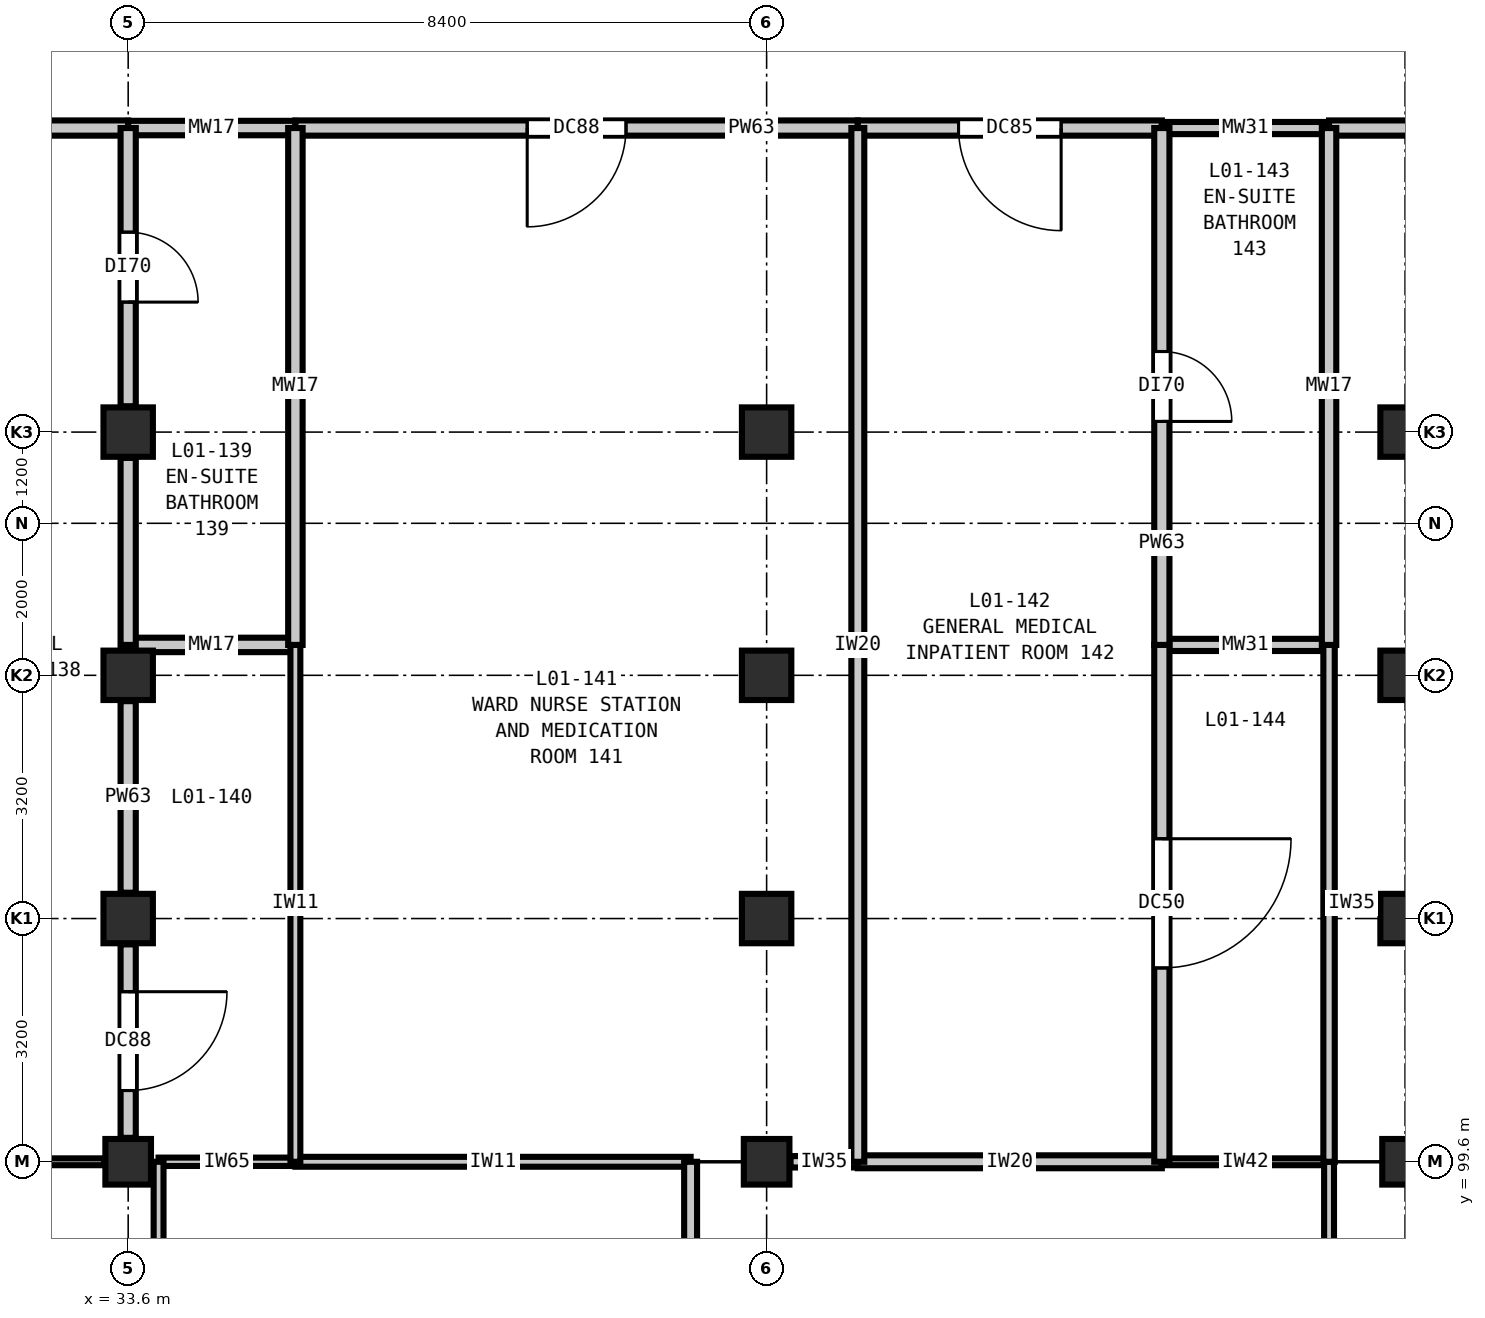
"""IFC4 building model, lengths in metres.
Left out: names, types, materials, properties, quantities, classifications, styles, units other than length and angle.
Written with IfcOpenShell. Run it as: python <this file> out.ifc"""

import sys

from ifc_helpers import new_model, si_unit, direction, frame, frame_2d, origin, origin_2d, place, context, subcontext, project, spatial, rectangle, extrude, element, fill, save


model = new_model("IFC4")
c1 = context("Model", 3, precision=1e-05, world=origin(), true_north=direction((0.0, 1.0)))
c2 = subcontext(c1, "Body", "Model", "MODEL_VIEW")
j1 = project(units=[si_unit("LENGTHUNIT", "METRE"), si_unit("PLANEANGLEUNIT", "RADIAN")], contexts=[c1])
p1 = place(None, origin())
s1 = spatial("IfcSite", under=j1, at=p1, CompositionType="ELEMENT")
p2 = place(p1, origin())
s2 = spatial("IfcBuilding", under=s1, at=p2, CompositionType="ELEMENT")
p3 = place(p2, frame((0.0, 0.0, 5.4)))
s3 = spatial("IfcBuildingStorey", under=s2, at=p3, CompositionType="ELEMENT", Elevation=5.4)
p4 = place(p3, frame((33.6, 99.6, 0.0), z_axis=(0.0, 0.0, 1.0), x_axis=(1.0, 0.0, 0.0)))
e1 = element("IfcColumn", 1, at=p4, inside=s3, PredefinedType="COLUMN", context=c2, shape_type="SweptSolid", body=[
    extrude(rectangle(XDim=0.6, YDim=0.6, at=origin_2d()), origin(), (0.0, 0.0, 1.0), 5.4),
])
for number, where, z_axis, x_axis in (
    (2, (33.6, 102.8, 0.0), (0.0, 0.0, 1.0), (1.0, 0.0, 0.0)),
    (3, (33.6, 106.0, 0.0), (0.0, 0.0, 1.0), (1.0, 0.0, 0.0)),
    (4, (33.6, 109.2, 0.0), (0.0, 0.0, 1.0), (1.0, 0.0, 0.0)),
):
    element("IfcColumn", number, at=place(p3, frame(where, z_axis=z_axis, x_axis=x_axis)), inside=s3, PredefinedType="COLUMN", context=c2, shape_type="SweptSolid", body=[
        extrude(rectangle(XDim=0.65, YDim=0.65, at=origin_2d()), origin(), (0.0, 0.0, 1.0), 5.4),
    ])
p5 = place(p3, frame((42.0, 99.6, 0.0), z_axis=(0.0, 0.0, 1.0), x_axis=(1.0, 0.0, 0.0)))
e5 = element("IfcColumn", 5, at=p5, inside=s3, PredefinedType="COLUMN", context=c2, shape_type="SweptSolid", body=[
    extrude(rectangle(XDim=0.6, YDim=0.6, at=origin_2d()), origin(), (0.0, 0.0, 1.0), 5.4),
])
for number, where, z_axis, x_axis in (
    (6, (42.0, 102.8, 0.0), (0.0, 0.0, 1.0), (1.0, 0.0, 0.0)),
    (7, (42.0, 106.0, 0.0), (0.0, 0.0, 1.0), (1.0, 0.0, 0.0)),
    (8, (42.0, 109.2, 0.0), (0.0, 0.0, 1.0), (1.0, 0.0, 0.0)),
):
    element("IfcColumn", number, at=place(p3, frame(where, z_axis=z_axis, x_axis=x_axis)), inside=s3, PredefinedType="COLUMN", context=c2, shape_type="SweptSolid", body=[
        extrude(rectangle(XDim=0.65, YDim=0.65, at=origin_2d()), origin(), (0.0, 0.0, 1.0), 5.4),
    ])
p6 = place(p3, frame((50.4, 99.6, 0.0), z_axis=(0.0, 0.0, 1.0), x_axis=(1.0, 0.0, 0.0)))
e9 = element("IfcColumn", 9, at=p6, inside=s3, PredefinedType="COLUMN", context=c2, shape_type="SweptSolid", body=[
    extrude(rectangle(XDim=0.6, YDim=0.6, at=origin_2d()), origin(), (0.0, 0.0, 1.0), 5.4),
])
for number, where, z_axis, x_axis in (
    (10, (50.4, 102.8, 0.0), (0.0, 0.0, 1.0), (1.0, 0.0, 0.0)),
    (11, (50.4, 106.0, 0.0), (0.0, 0.0, 1.0), (1.0, 0.0, 0.0)),
    (12, (50.4, 109.2, 0.0), (0.0, 0.0, 1.0), (1.0, 0.0, 0.0)),
):
    element("IfcColumn", number, at=place(p3, frame(where, z_axis=z_axis, x_axis=x_axis)), inside=s3, PredefinedType="COLUMN", context=c2, shape_type="SweptSolid", body=[
        extrude(rectangle(XDim=0.65, YDim=0.65, at=origin_2d()), origin(), (0.0, 0.0, 1.0), 5.4),
    ])
p7 = place(p3, frame((29.6, 99.6, 0.0), z_axis=(0.0, 0.0, 1.0), x_axis=(1.0, 0.0, 0.0)))
e13 = element("IfcWall", 13, at=p7, inside=s3, PredefinedType="PARTITIONING", context=c2, shape_type="SweptSolid", body=[
    extrude(rectangle(XDim=3.685, YDim=0.09, at=frame_2d((1.842, 0.0))), origin(), (0.0, 0.0, 1.0), 4.685),
])
p8 = place(p3, frame((34.0, 99.6, 0.0), z_axis=(0.0, 0.0, 1.0), x_axis=(1.0, 0.0, 0.0)))
e14 = element("IfcWall", 14, at=p8, inside=s3, PredefinedType="PARTITIONING", context=c2, shape_type="SweptSolid", body=[
    extrude(rectangle(XDim=1.8, YDim=0.11, at=frame_2d((0.9, 0.0))), origin(), (0.0, 0.0, 1.0), 4.685),
])
p9 = place(p3, frame((35.8, 99.6, 0.0), z_axis=(0.0, 0.0, 1.0), x_axis=(1.0, 0.0, 0.0)))
e15 = element("IfcWall", 15, at=p9, inside=s3, PredefinedType="PARTITIONING", context=c2, shape_type="SweptSolid", body=[
    extrude(rectangle(XDim=5.2, YDim=0.13, at=frame_2d((2.6, 0.0))), origin(), (0.0, 0.0, 1.0), 4.685),
])
p10 = place(p3, frame((42.315, 99.6, 0.0), z_axis=(0.0, 0.0, 1.0), x_axis=(1.0, 0.0, 0.0)))
e16 = element("IfcWall", 16, at=p10, inside=s3, PredefinedType="PARTITIONING", context=c2, shape_type="SweptSolid", body=[
    extrude(rectangle(XDim=0.885, YDim=0.15, at=frame_2d((0.442, 0.0))), origin(), (0.0, 0.0, 1.0), 4.685),
])
p11 = place(p3, frame((43.2, 99.6, 0.0), z_axis=(0.0, 0.0, 1.0), x_axis=(1.0, 0.0, 0.0)))
e17 = element("IfcWall", 17, at=p11, inside=s3, PredefinedType="PARTITIONING", context=c2, shape_type="SweptSolid", body=[
    extrude(rectangle(XDim=4.0, YDim=0.17, at=frame_2d((2.0, 0.0))), origin(), (0.0, 0.0, 1.0), 4.685),
])
p12 = place(p3, frame((47.2, 99.6, 0.0), z_axis=(0.0, 0.0, 1.0), x_axis=(1.0, 0.0, 0.0)))
e18 = element("IfcWall", 18, at=p12, inside=s3, PredefinedType="PARTITIONING", context=c2, shape_type="SweptSolid", body=[
    extrude(rectangle(XDim=2.2, YDim=0.09, at=frame_2d((1.1, 0.0))), origin(), (0.0, 0.0, 1.0), 4.685),
])
p13 = place(p3, frame((33.6, 106.4, 0.0), z_axis=(0.0, 0.0, 1.0), x_axis=(1.0, 0.0, 0.0)))
e19 = element("IfcWall", 19, at=p13, inside=s3, PredefinedType="PLUMBINGWALL", context=c2, shape_type="SweptSolid", body=[
    extrude(rectangle(XDim=2.2, YDim=0.19, at=frame_2d((1.1, 0.0))), origin(), (0.0, 0.0, 1.0), 5.05),
])
p14 = place(p3, frame((47.2, 106.4, 0.0), z_axis=(0.0, 0.0, 1.0), x_axis=(1.0, 0.0, 0.0)))
e20 = element("IfcWall", 20, at=p14, inside=s3, PredefinedType="PLUMBINGWALL", context=c2, shape_type="SweptSolid", body=[
    extrude(rectangle(XDim=2.2, YDim=0.16, at=frame_2d((1.1, 0.0))), origin(), (0.0, 0.0, 1.0), 5.05),
])
p15 = place(p3, frame((29.6, 113.2, 0.0), z_axis=(0.0, 0.0, 1.0), x_axis=(1.0, 0.0, 0.0)))
e21 = element("IfcWall", 21, at=p15, inside=s3, PredefinedType="PARTITIONING", context=c2, shape_type="SweptSolid", body=[
    extrude(rectangle(XDim=4.0, YDim=0.2, at=frame_2d((2.0, 0.0))), origin(), (0.0, 0.0, 1.0), 5.05),
])
p16 = place(p15, frame((1.375, 0.0, 0.0)))
e22 = element("IfcOpeningElement", 22, at=p16, cuts=e21, PredefinedType="OPENING", context=c2, shape_type="SweptSolid", body=[
    extrude(rectangle(XDim=1.25, YDim=2.15, at=frame_2d((0.625, 1.075))), frame((0.0, 0.11, 0.0), z_axis=(0.0, -1.0, 0.0), x_axis=(1.0, 0.0, 0.0)), (0.0, 0.0, 1.0), 0.22),
])
p17 = place(p3, frame((33.6, 113.2, 0.0), z_axis=(0.0, 0.0, 1.0), x_axis=(1.0, 0.0, 0.0)))
e23 = element("IfcWall", 23, at=p17, inside=s3, PredefinedType="PLUMBINGWALL", context=c2, shape_type="SweptSolid", body=[
    extrude(rectangle(XDim=2.2, YDim=0.19, at=frame_2d((1.1, 0.0))), origin(), (0.0, 0.0, 1.0), 5.05),
])
p18 = place(p3, frame((35.8, 113.2, 0.0), z_axis=(0.0, 0.0, 1.0), x_axis=(1.0, 0.0, 0.0)))
e24 = element("IfcWall", 24, at=p18, inside=s3, PredefinedType="PARTITIONING", context=c2, shape_type="SweptSolid", body=[
    extrude(rectangle(XDim=7.4, YDim=0.2, at=frame_2d((3.7, 0.0))), origin(), (0.0, 0.0, 1.0), 5.05),
])
p19 = place(p18, frame((3.05, 0.0, 0.0)))
e25 = element("IfcOpeningElement", 25, at=p19, cuts=e24, PredefinedType="OPENING", context=c2, shape_type="SweptSolid", body=[
    extrude(rectangle(XDim=1.3, YDim=2.2, at=frame_2d((0.65, 1.1))), frame((0.0, 0.11, 0.0), z_axis=(0.0, -1.0, 0.0), x_axis=(1.0, 0.0, 0.0)), (0.0, 0.0, 1.0), 0.22),
])
p20 = place(p3, frame((43.2, 113.2, 0.0), z_axis=(0.0, 0.0, 1.0), x_axis=(1.0, 0.0, 0.0)))
e26 = element("IfcWall", 26, at=p20, inside=s3, PredefinedType="PARTITIONING", context=c2, shape_type="SweptSolid", body=[
    extrude(rectangle(XDim=4.0, YDim=0.2, at=frame_2d((2.0, 0.0))), origin(), (0.0, 0.0, 1.0), 5.05),
])
p21 = place(p20, frame((1.325, 0.0, 0.0)))
e27 = element("IfcOpeningElement", 27, at=p21, cuts=e26, PredefinedType="OPENING", context=c2, shape_type="SweptSolid", body=[
    extrude(rectangle(XDim=1.35, YDim=2.2, at=frame_2d((0.675, 1.1))), frame((0.0, 0.11, 0.0), z_axis=(0.0, -1.0, 0.0), x_axis=(1.0, 0.0, 0.0)), (0.0, 0.0, 1.0), 0.22),
])
p22 = place(p3, frame((47.2, 113.2, 0.0), z_axis=(0.0, 0.0, 1.0), x_axis=(1.0, 0.0, 0.0)))
e28 = element("IfcWall", 28, at=p22, inside=s3, PredefinedType="PLUMBINGWALL", context=c2, shape_type="SweptSolid", body=[
    extrude(rectangle(XDim=2.2, YDim=0.16, at=frame_2d((1.1, 0.0))), origin(), (0.0, 0.0, 1.0), 5.05),
])
p23 = place(p3, frame((49.4, 113.2, 0.0), z_axis=(0.0, 0.0, 1.0), x_axis=(1.0, 0.0, 0.0)))
e29 = element("IfcWall", 29, at=p23, inside=s3, PredefinedType="PARTITIONING", context=c2, shape_type="SweptSolid", body=[
    extrude(rectangle(XDim=7.4, YDim=0.2, at=frame_2d((3.7, 0.0))), origin(), (0.0, 0.0, 1.0), 5.05),
])
p24 = place(p23, frame((2.975, 0.0, 0.0)))
e30 = element("IfcOpeningElement", 30, at=p24, cuts=e29, PredefinedType="OPENING", context=c2, shape_type="SweptSolid", body=[
    extrude(rectangle(XDim=1.45, YDim=2.25, at=frame_2d((0.725, 1.125))), frame((0.0, 0.11, 0.0), z_axis=(0.0, -1.0, 0.0), x_axis=(1.0, 0.0, 0.0)), (0.0, 0.0, 1.0), 0.22),
])
p25 = place(p3, frame((33.6, 99.915, 0.0), z_axis=(0.0, 0.0, 1.0), x_axis=(0.0, 1.0, 0.0)))
e31 = element("IfcWall", 31, at=p25, inside=s3, PredefinedType="PARTITIONING", context=c2, shape_type="SweptSolid", body=[
    extrude(rectangle(XDim=2.545, YDim=0.2, at=frame_2d((1.272, 0.0))), origin(), (0.0, 0.0, 1.0), 4.735),
])
p26 = place(p25, frame((0.623, 0.0, 0.0)))
e32 = element("IfcOpeningElement", 32, at=p26, cuts=e31, PredefinedType="OPENING", context=c2, shape_type="SweptSolid", body=[
    extrude(rectangle(XDim=1.3, YDim=2.2, at=frame_2d((0.65, 1.1))), frame((0.0, 0.11, 0.0), z_axis=(0.0, -1.0, 0.0), x_axis=(1.0, 0.0, 0.0)), (0.0, 0.0, 1.0), 0.22),
])
p27 = place(p3, frame((33.6, 103.14, 0.0), z_axis=(0.0, 0.0, 1.0), x_axis=(0.0, 1.0, 0.0)))
e33 = element("IfcWall", 33, at=p27, inside=s3, PredefinedType="PARTITIONING", context=c2, shape_type="SweptSolid", body=[
    extrude(rectangle(XDim=2.52, YDim=0.2, at=frame_2d((1.26, 0.0))), origin(), (0.0, 0.0, 1.0), 4.735),
])
p28 = place(p3, frame((33.6, 109.54, 0.0), z_axis=(0.0, 0.0, 1.0), x_axis=(0.0, 1.0, 0.0)))
e34 = element("IfcWall", 34, at=p28, inside=s3, PredefinedType="PARTITIONING", context=c2, shape_type="SweptSolid", body=[
    extrude(rectangle(XDim=3.66, YDim=0.2, at=frame_2d((1.83, 0.0))), origin(), (0.0, 0.0, 1.0), 4.735),
])
p29 = place(p28, frame((1.37, 0.0, 0.0)))
e35 = element("IfcOpeningElement", 35, at=p29, cuts=e34, PredefinedType="OPENING", context=c2, shape_type="SweptSolid", body=[
    extrude(rectangle(XDim=0.92, YDim=2.1, at=frame_2d((0.46, 1.05))), frame((0.0, 0.11, 0.0), z_axis=(0.0, -1.0, 0.0), x_axis=(1.0, 0.0, 0.0)), (0.0, 0.0, 1.0), 0.22),
])
p30 = place(p3, frame((33.6, 106.4, 0.0), z_axis=(0.0, 0.0, 1.0), x_axis=(0.0, 1.0, 0.0)))
e36 = element("IfcWall", 36, at=p30, inside=s3, PredefinedType="PARTITIONING", context=c2, shape_type="SweptSolid", body=[
    extrude(rectangle(XDim=2.46, YDim=0.2, at=frame_2d((1.23, 0.0))), origin(), (0.0, 0.0, 1.0), 4.735),
])
p31 = place(p3, frame((34.0, 88.6, 0.0), z_axis=(0.0, 0.0, 1.0), x_axis=(0.0, 1.0, 0.0)))
e37 = element("IfcWall", 37, at=p31, inside=s3, PredefinedType="PARTITIONING", context=c2, shape_type="SweptSolid", body=[
    extrude(rectangle(XDim=11.0, YDim=0.13, at=frame_2d((5.5, 0.0))), origin(), (0.0, 0.0, 1.0), 5.05),
])
p32 = place(p3, frame((35.8, 99.6, 0.0), z_axis=(0.0, 0.0, 1.0), x_axis=(0.0, 1.0, 0.0)))
e38 = element("IfcWall", 38, at=p32, inside=s3, PredefinedType="PARTITIONING", context=c2, shape_type="SweptSolid", body=[
    extrude(rectangle(XDim=6.8, YDim=0.13, at=frame_2d((3.4, 0.0))), origin(), (0.0, 0.0, 1.0), 5.05),
])
p33 = place(p3, frame((35.8, 106.4, 0.0), z_axis=(0.0, 0.0, 1.0), x_axis=(0.0, 1.0, 0.0)))
e39 = element("IfcWall", 39, at=p33, inside=s3, PredefinedType="PLUMBINGWALL", context=c2, shape_type="SweptSolid", body=[
    extrude(rectangle(XDim=6.8, YDim=0.19, at=frame_2d((3.4, 0.0))), origin(), (0.0, 0.0, 1.0), 5.05),
])
p34 = place(p3, frame((41.0, 88.6, 0.0), z_axis=(0.0, 0.0, 1.0), x_axis=(0.0, 1.0, 0.0)))
e40 = element("IfcWall", 40, at=p34, inside=s3, PredefinedType="PARTITIONING", context=c2, shape_type="SweptSolid", body=[
    extrude(rectangle(XDim=11.0, YDim=0.17, at=frame_2d((5.5, 0.0))), origin(), (0.0, 0.0, 1.0), 5.05),
])
p35 = place(p3, frame((43.2, 99.6, 0.0), z_axis=(0.0, 0.0, 1.0), x_axis=(0.0, 1.0, 0.0)))
e41 = element("IfcWall", 41, at=p35, inside=s3, PredefinedType="PARTITIONING", context=c2, shape_type="SweptSolid", body=[
    extrude(rectangle(XDim=13.6, YDim=0.17, at=frame_2d((6.8, 0.0))), origin(), (0.0, 0.0, 1.0), 5.05),
])
p36 = place(p3, frame((47.2, 99.6, 0.0), z_axis=(0.0, 0.0, 1.0), x_axis=(0.0, 1.0, 0.0)))
e42 = element("IfcWall", 42, at=p36, inside=s3, PredefinedType="PARTITIONING", context=c2, shape_type="SweptSolid", body=[
    extrude(rectangle(XDim=6.8, YDim=0.2, at=frame_2d((3.4, 0.0))), origin(), (0.0, 0.0, 1.0), 5.05),
])
p37 = place(p36, frame((2.55, 0.0, 0.0)))
e43 = element("IfcOpeningElement", 43, at=p37, cuts=e42, PredefinedType="OPENING", context=c2, shape_type="SweptSolid", body=[
    extrude(rectangle(XDim=1.7, YDim=2.3, at=frame_2d((0.85, 1.15))), frame((0.0, 0.11, 0.0), z_axis=(0.0, -1.0, 0.0), x_axis=(1.0, 0.0, 0.0)), (0.0, 0.0, 1.0), 0.22),
])
p38 = place(p3, frame((47.2, 106.4, 0.0), z_axis=(0.0, 0.0, 1.0), x_axis=(0.0, 1.0, 0.0)))
e44 = element("IfcWall", 44, at=p38, inside=s3, PredefinedType="PARTITIONING", context=c2, shape_type="SweptSolid", body=[
    extrude(rectangle(XDim=6.8, YDim=0.2, at=frame_2d((3.4, 0.0))), origin(), (0.0, 0.0, 1.0), 5.05),
])
p39 = place(p38, frame((2.94, 0.0, 0.0)))
e45 = element("IfcOpeningElement", 45, at=p39, cuts=e44, PredefinedType="OPENING", context=c2, shape_type="SweptSolid", body=[
    extrude(rectangle(XDim=0.92, YDim=2.1, at=frame_2d((0.46, 1.05))), frame((0.0, 0.11, 0.0), z_axis=(0.0, -1.0, 0.0), x_axis=(1.0, 0.0, 0.0)), (0.0, 0.0, 1.0), 0.22),
])
p40 = place(p3, frame((49.4, 88.6, 0.0), z_axis=(0.0, 0.0, 1.0), x_axis=(0.0, 1.0, 0.0)))
e46 = element("IfcWall", 46, at=p40, inside=s3, PredefinedType="PARTITIONING", context=c2, shape_type="SweptSolid", body=[
    extrude(rectangle(XDim=11.0, YDim=0.13, at=frame_2d((5.5, 0.0))), origin(), (0.0, 0.0, 1.0), 5.05),
])
p41 = place(p3, frame((49.4, 99.6, 0.0), z_axis=(0.0, 0.0, 1.0), x_axis=(0.0, 1.0, 0.0)))
e47 = element("IfcWall", 47, at=p41, inside=s3, PredefinedType="PARTITIONING", context=c2, shape_type="SweptSolid", body=[
    extrude(rectangle(XDim=6.8, YDim=0.15, at=frame_2d((3.4, 0.0))), origin(), (0.0, 0.0, 1.0), 5.05),
])
p42 = place(p3, frame((49.4, 106.4, 0.0), z_axis=(0.0, 0.0, 1.0), x_axis=(0.0, 1.0, 0.0)))
e48 = element("IfcWall", 48, at=p42, inside=s3, PredefinedType="PLUMBINGWALL", context=c2, shape_type="SweptSolid", body=[
    extrude(rectangle(XDim=6.8, YDim=0.19, at=frame_2d((3.4, 0.0))), origin(), (0.0, 0.0, 1.0), 5.05),
])
p43 = place(p19, frame((1.3, 0.0, 0.0), z_axis=(0.0, 0.0, 1.0), x_axis=(-1.0, 0.0, 0.0)))
e49 = element("IfcDoor", 49, at=p43, inside=s3, OperationType="SINGLE_SWING_RIGHT", PredefinedType="DOOR", context=c2, shape_type="SweptSolid", body=[
    extrude(rectangle(XDim=1.3, YDim=2.2, at=frame_2d((0.65, 1.1))), frame((0.0, 0.025, 0.0), z_axis=(0.0, -1.0, 0.0), x_axis=(1.0, 0.0, 0.0)), (0.0, 0.0, 1.0), 0.05),
])
fill(e25, e49)
p44 = place(p21, frame((1.35, 0.0, 0.0), z_axis=(0.0, 0.0, 1.0), x_axis=(-1.0, 0.0, 0.0)))
e50 = element("IfcDoor", 50, at=p44, inside=s3, OperationType="SINGLE_SWING_LEFT", PredefinedType="DOOR", context=c2, shape_type="SweptSolid", body=[
    extrude(rectangle(XDim=1.35, YDim=2.2, at=frame_2d((0.675, 1.1))), frame((0.0, 0.025, 0.0), z_axis=(0.0, -1.0, 0.0), x_axis=(1.0, 0.0, 0.0)), (0.0, 0.0, 1.0), 0.05),
])
fill(e27, e50)
p45 = place(p26, frame((1.3, 0.0, 0.0), z_axis=(0.0, 0.0, 1.0), x_axis=(-1.0, 0.0, 0.0)))
e51 = element("IfcDoor", 51, at=p45, inside=s3, OperationType="SINGLE_SWING_LEFT", PredefinedType="DOOR", context=c2, shape_type="SweptSolid", body=[
    extrude(rectangle(XDim=1.3, YDim=2.2, at=frame_2d((0.65, 1.1))), frame((0.0, 0.025, 0.0), z_axis=(0.0, -1.0, 0.0), x_axis=(1.0, 0.0, 0.0)), (0.0, 0.0, 1.0), 0.05),
])
fill(e32, e51)
p46 = place(p29, frame((0.92, 0.0, 0.0), z_axis=(0.0, 0.0, 1.0), x_axis=(-1.0, 0.0, 0.0)))
e52 = element("IfcDoor", 52, at=p46, inside=s3, OperationType="SINGLE_SWING_RIGHT", PredefinedType="DOOR", context=c2, shape_type="SweptSolid", body=[
    extrude(rectangle(XDim=0.92, YDim=2.1, at=frame_2d((0.46, 1.05))), frame((0.0, 0.025, 0.0), z_axis=(0.0, -1.0, 0.0), x_axis=(1.0, 0.0, 0.0)), (0.0, 0.0, 1.0), 0.05),
])
fill(e35, e52)
p47 = place(p37, frame((1.7, 0.0, 0.0), z_axis=(0.0, 0.0, 1.0), x_axis=(-1.0, 0.0, 0.0)))
e53 = element("IfcDoor", 53, at=p47, inside=s3, OperationType="SINGLE_SWING_LEFT", PredefinedType="DOOR", context=c2, shape_type="SweptSolid", body=[
    extrude(rectangle(XDim=1.7, YDim=2.3, at=frame_2d((0.85, 1.15))), frame((0.0, 0.025, 0.0), z_axis=(0.0, -1.0, 0.0), x_axis=(1.0, 0.0, 0.0)), (0.0, 0.0, 1.0), 0.05),
])
fill(e43, e53)
p48 = place(p39, frame((0.92, 0.0, 0.0), z_axis=(0.0, 0.0, 1.0), x_axis=(-1.0, 0.0, 0.0)))
e54 = element("IfcDoor", 54, at=p48, inside=s3, OperationType="SINGLE_SWING_RIGHT", PredefinedType="DOOR", context=c2, shape_type="SweptSolid", body=[
    extrude(rectangle(XDim=0.92, YDim=2.1, at=frame_2d((0.46, 1.05))), frame((0.0, 0.025, 0.0), z_axis=(0.0, -1.0, 0.0), x_axis=(1.0, 0.0, 0.0)), (0.0, 0.0, 1.0), 0.05),
])
fill(e45, e54)
save(model, sys.argv[1])
